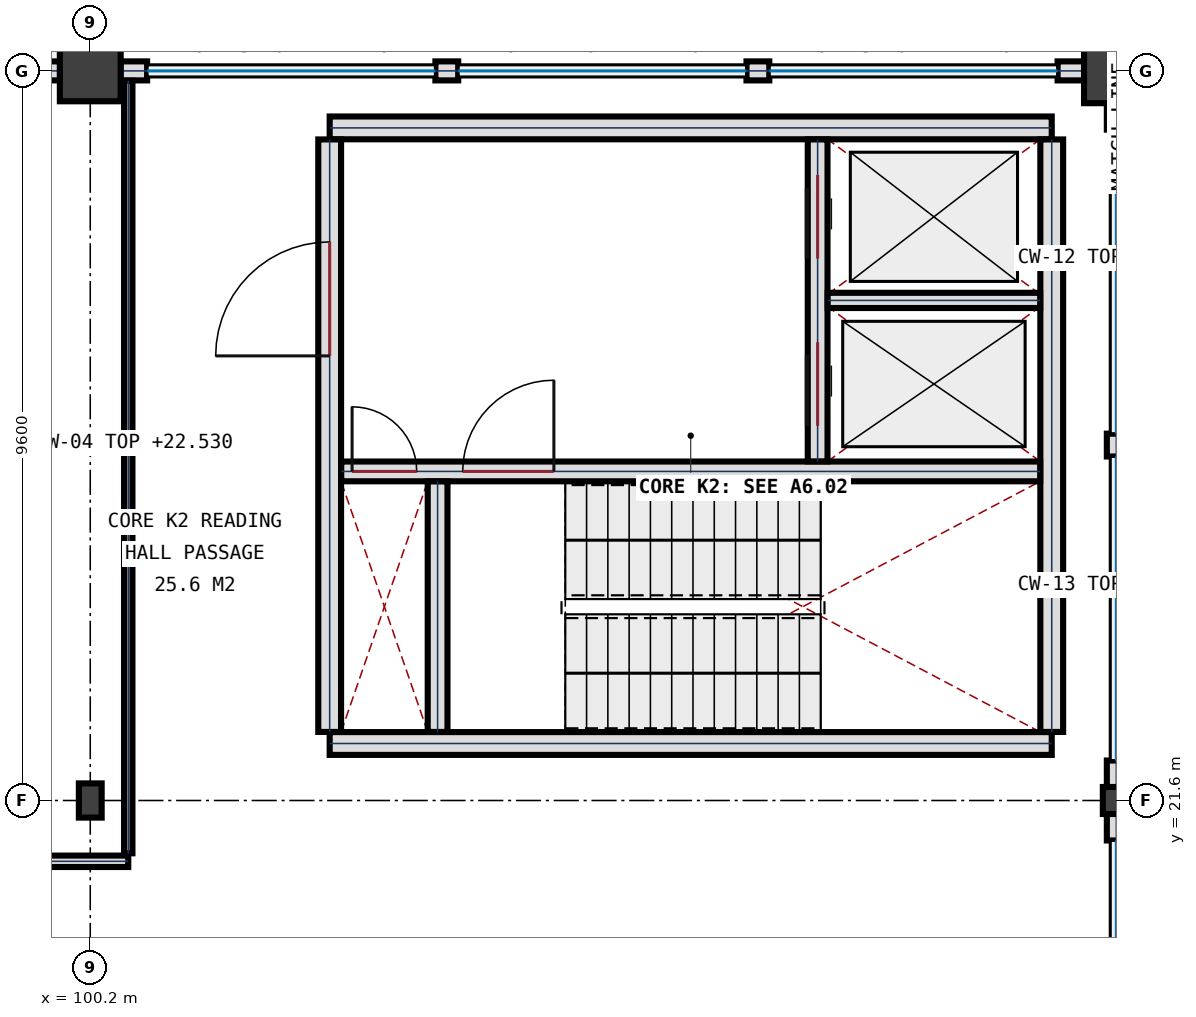
"""IFC4 building model, lengths in metres.
Left out: names, types, materials, properties, quantities, classifications, styles, units other than length and angle.
Written with IfcOpenShell. Run it as: python <this file> out.ifc"""

import sys

from ifc_helpers import new_model, si_unit, direction, frame, frame_2d, origin, origin_2d, place, context, subcontext, project, spatial, rectangle, hollow_circle, i_section, extrude, element, fill, save


model = new_model("IFC4")
c1 = context("Model", 3, precision=1e-05, world=origin(), true_north=direction((0.0, 1.0)))
c2 = subcontext(c1, "Body", "Model", "MODEL_VIEW")
j1 = project(units=[si_unit("LENGTHUNIT", "METRE"), si_unit("PLANEANGLEUNIT", "RADIAN")], contexts=[c1])
p1 = place(None, origin())
s1 = spatial("IfcSite", under=j1, at=p1, CompositionType="ELEMENT")
p2 = place(p1, origin())
s2 = spatial("IfcBuilding", under=s1, at=p2, CompositionType="ELEMENT")
p3 = place(p2, frame((0.0, 0.0, 18.9)))
s3 = spatial("IfcBuildingStorey", under=s2, at=p3, CompositionType="ELEMENT", Elevation=18.9)
p4 = place(p3, frame((100.2, 21.6, 0.0), z_axis=(0.0, 0.0, 1.0), x_axis=(1.0, 0.0, 0.0)))
e1 = element("IfcColumn", 1, at=p4, inside=s3, PredefinedType="COLUMN", context=c2, shape_type="SweptSolid", body=[
    extrude(i_section(OverallWidth=0.3, OverallDepth=0.45, WebThickness=0.014, FlangeThickness=0.026, FilletRadius=0.027, at=origin_2d()), origin(), (0.0, 0.0, 1.0), 4.5),
])
p5 = place(p3, frame((100.2, 31.2, 0.0), z_axis=(0.0, 0.0, 1.0), x_axis=(1.0, 0.0, 0.0)))
e2 = element("IfcColumn", 2, at=p5, inside=s3, PredefinedType="COLUMN", context=c2, shape_type="SweptSolid", body=[
    extrude(rectangle(XDim=0.8, YDim=0.8, at=origin_2d()), origin(), (0.0, 0.0, 1.0), 4.5),
])
p6 = place(p3, frame((113.7, 21.6, 0.0), z_axis=(0.0, 0.0, 1.0), x_axis=(1.0, 0.0, 0.0)))
e3 = element("IfcColumn", 3, at=p6, inside=s3, PredefinedType="COLUMN", context=c2, shape_type="SweptSolid", body=[
    extrude(hollow_circle(Radius=0.178, WallThickness=0.014, at=origin_2d()), origin(), (0.0, 0.0, 1.0), 4.5),
])
p7 = place(p3, frame((113.7, 31.2, 0.0), z_axis=(0.0, 0.0, 1.0), x_axis=(1.0, 0.0, 0.0)))
e4 = element("IfcColumn", 4, at=p7, inside=s3, PredefinedType="COLUMN", context=c2, shape_type="SweptSolid", body=[
    extrude(rectangle(XDim=0.85, YDim=0.85, at=origin_2d()), origin(), (0.0, 0.0, 1.0), 4.5),
])
p8 = place(p3, frame((113.7, 30.777, 0.0), z_axis=(0.0, 0.0, 1.0), x_axis=(0.0, -1.0, 0.0)))
e5 = element("IfcWall", 5, at=p8, inside=s3, PredefinedType="SOLIDWALL", context=c2, shape_type="SweptSolid", body=[
    extrude(rectangle(XDim=0.35, YDim=0.25, at=frame_2d((0.175, 0.0))), origin(), (0.0, 0.0, 1.0), 3.63),
])
p9 = place(p3, frame((113.7, 22.126, 0.0), z_axis=(0.0, 0.0, 1.0), x_axis=(0.0, -1.0, 0.0)))
e6 = element("IfcWall", 6, at=p9, inside=s3, PredefinedType="SOLIDWALL", context=c2, shape_type="SweptSolid", body=[
    extrude(rectangle(XDim=0.35, YDim=0.25, at=frame_2d((0.175, 0.0))), origin(), (0.0, 0.0, 1.0), 3.63),
])
p10 = place(p3, frame((113.7, 26.427, 0.0), z_axis=(0.0, 0.0, 1.0), x_axis=(0.0, -1.0, 0.0)))
e7 = element("IfcWall", 7, at=p10, inside=s3, PredefinedType="SOLIDWALL", context=c2, shape_type="SweptSolid", body=[
    extrude(rectangle(XDim=0.3, YDim=0.25, at=frame_2d((0.15, 0.0))), origin(), (0.0, 0.0, 1.0), 3.63),
])
p11 = place(p3, frame((113.7, 21.424, 0.0), z_axis=(0.0, 0.0, 1.0), x_axis=(0.0, -1.0, 0.0)))
e8 = element("IfcWall", 8, at=p11, inside=s3, PredefinedType="SOLIDWALL", context=c2, shape_type="SweptSolid", body=[
    extrude(rectangle(XDim=0.35, YDim=0.25, at=frame_2d((0.175, 0.0))), origin(), (0.0, 0.0, 1.0), 3.63),
])
p12 = place(p3, frame((99.452, 31.2, 0.0), z_axis=(0.0, 0.0, 1.0), x_axis=(1.0, 0.0, 0.0)))
e9 = element("IfcWall", 9, at=p12, inside=s3, PredefinedType="SOLIDWALL", context=c2, shape_type="SweptSolid", body=[
    extrude(rectangle(XDim=0.35, YDim=0.25, at=frame_2d((0.175, 0.0))), origin(), (0.0, 0.0, 1.0), 3.79),
])
for number, where, z_axis, x_axis in (
    (10, (100.598, 31.2, 0.0), (0.0, 0.0, 1.0), (1.0, 0.0, 0.0)),
    (11, (112.927, 31.2, 0.0), (0.0, 0.0, 1.0), (1.0, 0.0, 0.0)),
):
    element("IfcWall", number, at=place(p3, frame(where, z_axis=z_axis, x_axis=x_axis)), inside=s3, PredefinedType="SOLIDWALL", context=c2, shape_type="SweptSolid", body=[
        extrude(rectangle(XDim=0.35, YDim=0.25, at=frame_2d((0.175, 0.0))), origin(), (0.0, 0.0, 1.0), 3.84),
    ])
for number, where, z_axis, x_axis in (
    (12, (104.741, 31.2, 0.0), (0.0, 0.0, 1.0), (1.0, 0.0, 0.0)),
    (13, (108.834, 31.2, 0.0), (0.0, 0.0, 1.0), (1.0, 0.0, 0.0)),
):
    element("IfcWall", number, at=place(p3, frame(where, z_axis=z_axis, x_axis=x_axis)), inside=s3, PredefinedType="SOLIDWALL", context=c2, shape_type="SweptSolid", body=[
        extrude(rectangle(XDim=0.3, YDim=0.25, at=frame_2d((0.15, 0.0))), origin(), (0.0, 0.0, 1.0), 3.84),
    ])
for number, where, z_axis, x_axis in (
    (14, (112.85, 22.35, 0.0), (0.0, 0.0, 1.0), (-1.0, 0.0, 0.0)),
    (15, (103.35, 30.45, 0.0), (0.0, 0.0, 1.0), (1.0, 0.0, 0.0)),
):
    element("IfcWall", number, at=place(p3, frame(where, z_axis=z_axis, x_axis=x_axis)), inside=s3, PredefinedType="SHEAR", context=c2, shape_type="SweptSolid", body=[
        extrude(rectangle(XDim=9.5, YDim=0.3, at=frame_2d((4.75, 0.0))), origin(), (0.0, 0.0, 1.0), 4.5),
    ])
p13 = place(p3, frame((103.35, 22.502, 0.0), z_axis=(0.0, 0.0, 1.0), x_axis=(0.0, 1.0, 0.0)))
e16 = element("IfcWall", 16, at=p13, inside=s3, PredefinedType="SHEAR", context=c2, shape_type="SweptSolid", body=[
    extrude(rectangle(XDim=7.796, YDim=0.3, at=frame_2d((3.898, 0.0))), origin(), (0.0, 0.0, 1.0), 4.5),
])
p14 = place(p13, frame((4.948, 0.0, 0.0)))
e17 = element("IfcOpeningElement", 17, at=p14, cuts=e16, PredefinedType="OPENING", context=c2, shape_type="SweptSolid", body=[
    extrude(rectangle(XDim=1.5, YDim=2.25, at=frame_2d((0.75, 1.125))), frame((0.0, 0.16, 0.0), z_axis=(0.0, -1.0, 0.0), x_axis=(1.0, 0.0, 0.0)), (0.0, 0.0, 1.0), 0.32),
])
p15 = place(p3, frame((112.85, 30.298, 0.0), z_axis=(0.0, 0.0, 1.0), x_axis=(0.0, -1.0, 0.0)))
e18 = element("IfcWall", 18, at=p15, inside=s3, PredefinedType="SHEAR", context=c2, shape_type="SweptSolid", body=[
    extrude(rectangle(XDim=7.796, YDim=0.3, at=frame_2d((3.898, 0.0))), origin(), (0.0, 0.0, 1.0), 4.5),
])
p16 = place(p3, frame((103.502, 25.93, 0.0), z_axis=(0.0, 0.0, 1.0), x_axis=(1.0, 0.0, 0.0)))
e19 = element("IfcWall", 19, at=p16, inside=s3, PredefinedType="SHEAR", context=c2, shape_type="SweptSolid", body=[
    extrude(rectangle(XDim=9.196, YDim=0.26, at=frame_2d((4.598, 0.0))), origin(), (0.0, 0.0, 1.0), 4.5),
])
p17 = place(p16, frame((1.598, 0.0, 0.0)))
e20 = element("IfcOpeningElement", 20, at=p17, cuts=e19, PredefinedType="OPENING", context=c2, shape_type="SweptSolid", body=[
    extrude(rectangle(XDim=1.2, YDim=2.2, at=frame_2d((0.6, 1.1))), frame((0.0, 0.14, 0.0), z_axis=(0.0, -1.0, 0.0), x_axis=(1.0, 0.0, 0.0)), (0.0, 0.0, 1.0), 0.28),
])
p18 = place(p16, frame((0.143, 0.0, 0.0)))
e21 = element("IfcOpeningElement", 21, at=p18, cuts=e19, PredefinedType="OPENING", context=c2, shape_type="SweptSolid", body=[
    extrude(rectangle(XDim=0.85, YDim=2.05, at=frame_2d((0.425, 1.025))), frame((0.0, 0.14, 0.0), z_axis=(0.0, -1.0, 0.0), x_axis=(1.0, 0.0, 0.0)), (0.0, 0.0, 1.0), 0.28),
])
p19 = place(p3, frame((104.77, 22.502, 0.0), z_axis=(0.0, 0.0, 1.0), x_axis=(0.0, 1.0, 0.0)))
e22 = element("IfcWall", 22, at=p19, inside=s3, PredefinedType="SHEAR", context=c2, shape_type="SweptSolid", body=[
    extrude(rectangle(XDim=3.296, YDim=0.26, at=frame_2d((1.648, 0.0))), origin(), (0.0, 0.0, 1.0), 4.5),
])
p20 = place(p3, frame((109.77, 26.062, 0.0), z_axis=(0.0, 0.0, 1.0), x_axis=(0.0, 1.0, 0.0)))
e23 = element("IfcWall", 23, at=p20, inside=s3, PredefinedType="SHEAR", context=c2, shape_type="SweptSolid", body=[
    extrude(rectangle(XDim=4.236, YDim=0.26, at=frame_2d((2.118, 0.0))), origin(), (0.0, 0.0, 1.0), 4.5),
])
p21 = place(p20, frame((0.468, 0.0, 0.0)))
e24 = element("IfcOpeningElement", 24, at=p21, cuts=e23, PredefinedType="OPENING", context=c2, shape_type="SweptSolid", body=[
    extrude(rectangle(XDim=1.1, YDim=2.15, at=frame_2d((0.55, 1.075))), frame((0.0, 0.14, 0.0), z_axis=(0.0, -1.0, 0.0), x_axis=(1.0, 0.0, 0.0)), (0.0, 0.0, 1.0), 0.28),
])
p22 = place(p20, frame((2.668, 0.0, 0.0)))
e25 = element("IfcOpeningElement", 25, at=p22, cuts=e23, PredefinedType="OPENING", context=c2, shape_type="SweptSolid", body=[
    extrude(rectangle(XDim=1.1, YDim=2.15, at=frame_2d((0.55, 1.075))), frame((0.0, 0.14, 0.0), z_axis=(0.0, -1.0, 0.0), x_axis=(1.0, 0.0, 0.0)), (0.0, 0.0, 1.0), 0.28),
])
p23 = place(p3, frame((109.902, 28.18, 0.0), z_axis=(0.0, 0.0, 1.0), x_axis=(1.0, 0.0, 0.0)))
e26 = element("IfcWall", 26, at=p23, inside=s3, PredefinedType="PLUMBINGWALL", context=c2, shape_type="SweptSolid", body=[
    extrude(rectangle(XDim=2.796, YDim=0.2, at=frame_2d((1.398, 0.0))), origin(), (0.0, 0.0, 1.0), 4.24),
])
p24 = place(p3, frame((59.2, 20.8, 0.0), z_axis=(0.0, 0.0, 1.0), x_axis=(1.0, 0.0, 0.0)))
e27 = element("IfcWall", 27, at=p24, inside=s3, PredefinedType="PARTITIONING", context=c2, shape_type="SweptSolid", body=[
    extrude(rectangle(XDim=41.5, YDim=0.15, at=frame_2d((20.75, 0.0))), origin(), (0.0, 0.0, 1.0), 4.16),
])
p25 = place(p24, frame((19.875, 0.0, 0.0)))
e28 = element("IfcOpeningElement", 28, at=p25, cuts=e27, PredefinedType="OPENING", context=c2, shape_type="SweptSolid", body=[
    extrude(rectangle(XDim=1.85, YDim=2.35, at=frame_2d((0.925, 1.175))), frame((0.0, 0.085, 0.0), z_axis=(0.0, -1.0, 0.0), x_axis=(1.0, 0.0, 0.0)), (0.0, 0.0, 1.0), 0.17),
])
p26 = place(p3, frame((100.7, 20.905, 0.0), z_axis=(0.0, 0.0, 1.0), x_axis=(0.0, 1.0, 0.0)))
e29 = element("IfcWall", 29, at=p26, inside=s3, PredefinedType="PARTITIONING", context=c2, shape_type="SweptSolid", body=[
    extrude(rectangle(XDim=10.166, YDim=0.11, at=frame_2d((5.083, 0.0))), origin(), (0.0, 0.0, 1.0), 3.63),
])
p27 = place(p14, origin())
e30 = element("IfcDoor", 30, at=p27, inside=s3, OperationType="SINGLE_SWING_LEFT", PredefinedType="DOOR", context=c2, shape_type="SweptSolid", body=[
    extrude(rectangle(XDim=1.5, YDim=2.25, at=frame_2d((0.75, 1.125))), frame((0.0, 0.032, 0.0), z_axis=(0.0, -1.0, 0.0), x_axis=(1.0, 0.0, 0.0)), (0.0, 0.0, 1.0), 0.065),
])
fill(e17, e30)
p28 = place(p17, origin())
e31 = element("IfcDoor", 31, at=p28, inside=s3, OperationType="SINGLE_SWING_RIGHT", PredefinedType="DOOR", context=c2, shape_type="SweptSolid", body=[
    extrude(rectangle(XDim=1.2, YDim=2.2, at=frame_2d((0.6, 1.1))), frame((0.0, 0.032, 0.0), z_axis=(0.0, -1.0, 0.0), x_axis=(1.0, 0.0, 0.0)), (0.0, 0.0, 1.0), 0.065),
])
fill(e20, e31)
p29 = place(p18, origin())
e32 = element("IfcDoor", 32, at=p29, inside=s3, OperationType="SINGLE_SWING_LEFT", PredefinedType="DOOR", context=c2, shape_type="SweptSolid", body=[
    extrude(rectangle(XDim=0.85, YDim=2.05, at=frame_2d((0.425, 1.025))), frame((0.0, 0.032, 0.0), z_axis=(0.0, -1.0, 0.0), x_axis=(1.0, 0.0, 0.0)), (0.0, 0.0, 1.0), 0.065),
])
fill(e21, e32)
p30 = place(p21, origin())
e33 = element("IfcDoor", 33, at=p30, inside=s3, OperationType="SLIDING_TO_LEFT", PredefinedType="DOOR", context=c2, shape_type="SweptSolid", body=[
    extrude(rectangle(XDim=1.1, YDim=2.15, at=frame_2d((0.55, 1.075))), frame((0.0, 0.032, 0.0), z_axis=(0.0, -1.0, 0.0), x_axis=(1.0, 0.0, 0.0)), (0.0, 0.0, 1.0), 0.065),
])
fill(e24, e33)
p31 = place(p22, origin())
e34 = element("IfcDoor", 34, at=p31, inside=s3, OperationType="SLIDING_TO_LEFT", PredefinedType="DOOR", context=c2, shape_type="SweptSolid", body=[
    extrude(rectangle(XDim=1.1, YDim=2.15, at=frame_2d((0.55, 1.075))), frame((0.0, 0.032, 0.0), z_axis=(0.0, -1.0, 0.0), x_axis=(1.0, 0.0, 0.0)), (0.0, 0.0, 1.0), 0.065),
])
fill(e25, e34)
save(model, sys.argv[1])
